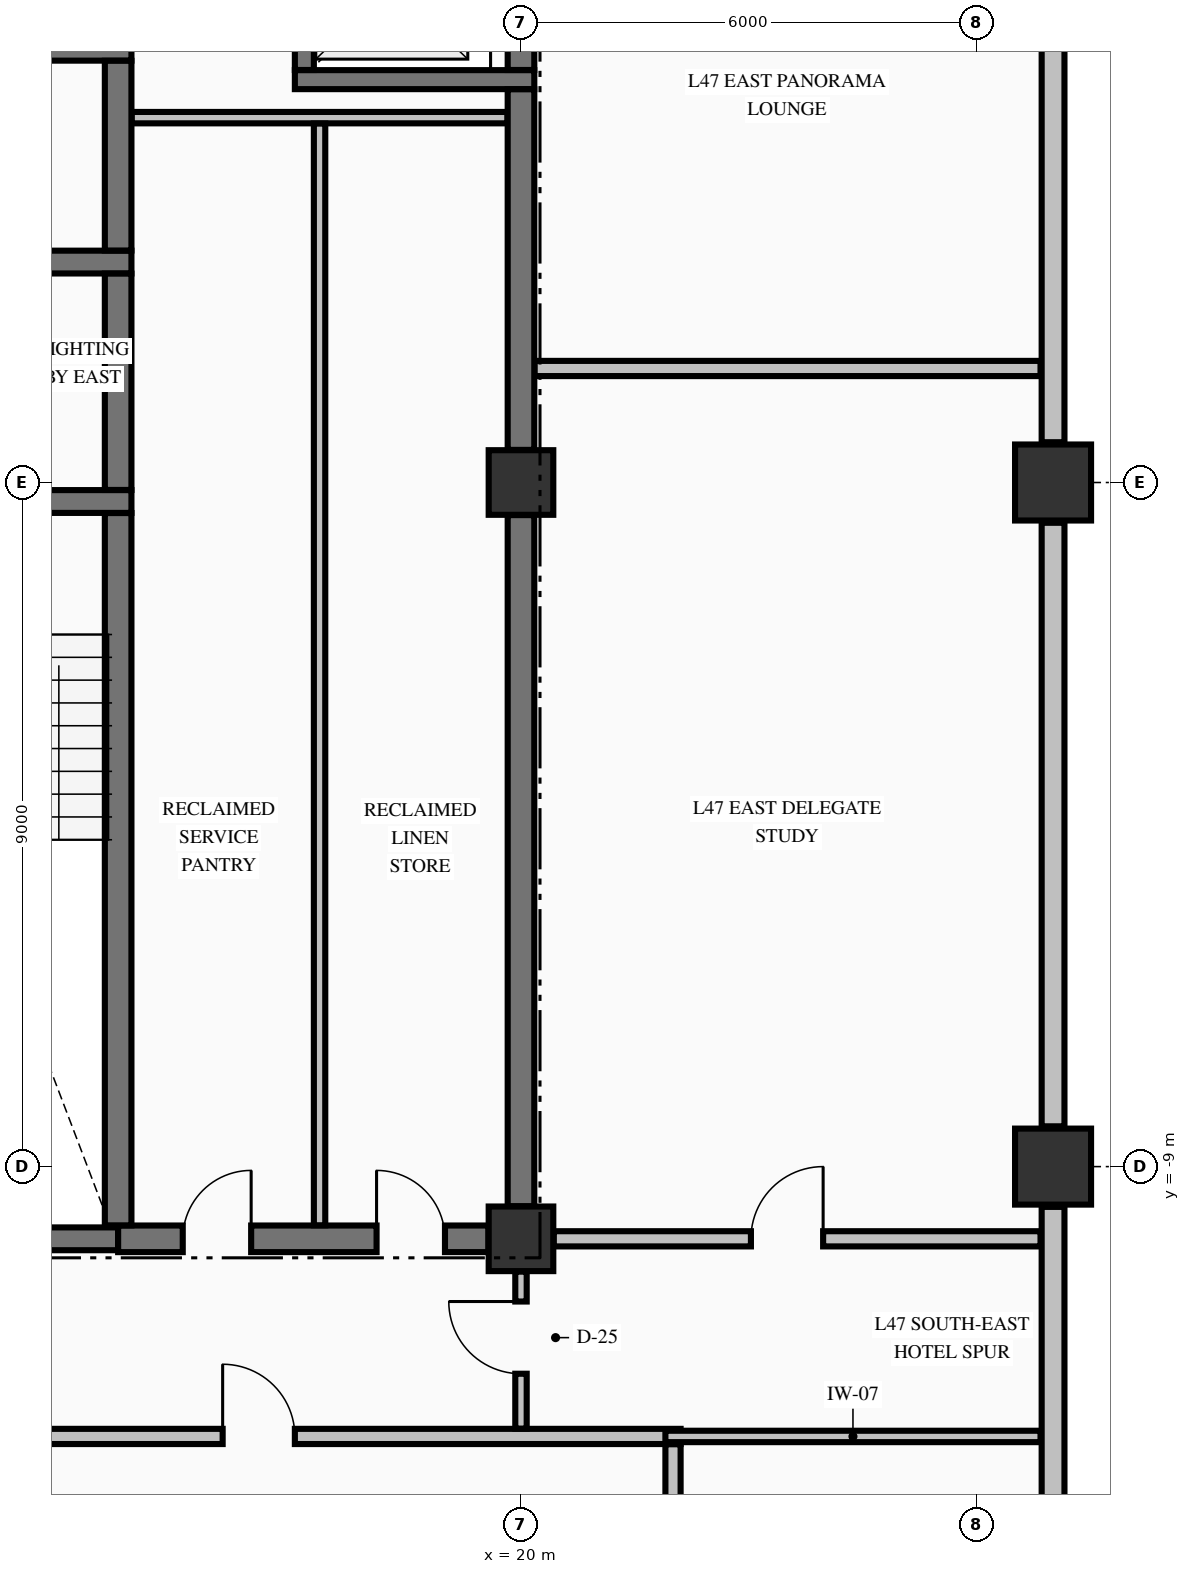
"""IFC4 building model, lengths in metres.
Left out: names, types, materials, properties, quantities, classifications, styles, units other than length and angle.
Written with IfcOpenShell. Run it as: python <this file> out.ifc"""

import sys

from ifc_helpers import new_model, si_unit, direction, frame, frame_2d, origin, origin_2d, place, context, subcontext, project, spatial, rectangle, extrude, element, fill, save


model = new_model("IFC4")
c1 = context("Model", 3, precision=1e-05, world=origin(), true_north=direction((0.0, 1.0)))
c2 = subcontext(c1, "Body", "Model", "MODEL_VIEW")
j1 = project(units=[si_unit("LENGTHUNIT", "METRE"), si_unit("PLANEANGLEUNIT", "RADIAN")], contexts=[c1])
p1 = place(None, origin())
s1 = spatial("IfcSite", under=j1, at=p1, CompositionType="ELEMENT")
p2 = place(p1, origin())
s2 = spatial("IfcBuilding", under=s1, at=p2, CompositionType="ELEMENT")
p3 = place(p2, frame((0.0, 0.0, 183.06)))
s3 = spatial("IfcBuildingStorey", under=s2, at=p3, CompositionType="ELEMENT", Elevation=183.06)
for number, where, z_axis, x_axis in (
    (1, (27.0, -9.0, -0.25), (0.0, 0.0, 1.0), (1.0, 0.0, 0.0)),
    (2, (27.0, 0.0, -0.25), (0.0, 0.0, 1.0), (1.0, 0.0, 0.0)),
):
    element("IfcColumn", number, at=place(p3, frame(where, z_axis=z_axis, x_axis=x_axis)), inside=s3, PredefinedType="COLUMN", context=c2, shape_type="SweptSolid", body=[
        extrude(rectangle(XDim=1.0, YDim=1.0, at=origin_2d()), origin(), (0.0, 0.0, 1.0), 3.225),
    ])
for number, where, z_axis, x_axis in (
    (3, (20.0, -9.95, -0.25), (0.0, 0.0, 1.0), (1.0, 0.0, 0.0)),
    (4, (20.0, 0.0, -0.25), (0.0, 0.0, 1.0), (1.0, 0.0, 0.0)),
):
    element("IfcColumn", number, at=place(p3, frame(where, z_axis=z_axis, x_axis=x_axis)), inside=s3, PredefinedType="COLUMN", context=c2, shape_type="SweptSolid", body=[
        extrude(rectangle(XDim=0.85, YDim=0.85, at=origin_2d()), origin(), (0.0, 0.0, 1.0), 3.225),
    ])
p4 = place(p3, frame((27.0, -18.97, 0.0), z_axis=(0.0, 0.0, 1.0), x_axis=(0.0, 1.0, 0.0)))
e5 = element("IfcWall", 5, at=p4, inside=s3, PredefinedType="STANDARD", context=c2, shape_type="SweptSolid", body=[
    extrude(rectangle(XDim=9.44, YDim=0.3, at=frame_2d((4.72, 0.0))), origin(), (0.0, 0.0, 1.0), 2.367),
])
for number, where, z_axis, x_axis in (
    (6, (27.0, -8.47, 0.0), (0.0, 0.0, 1.0), (0.0, 1.0, 0.0)),
    (7, (27.0, 0.53, 0.0), (0.0, 0.0, 1.0), (0.0, 1.0, 0.0)),
):
    element("IfcWall", number, at=place(p3, frame(where, z_axis=z_axis, x_axis=x_axis)), inside=s3, PredefinedType="STANDARD", context=c2, shape_type="SweptSolid", body=[
        extrude(rectangle(XDim=7.94, YDim=0.3, at=frame_2d((3.97, 0.0))), origin(), (0.0, 0.0, 1.0), 2.367),
    ])
p5 = place(p3, frame((11.429, -9.95, 0.0), z_axis=(0.0, 0.0, 1.0), x_axis=(1.0, 0.0, 0.0)))
e8 = element("IfcWall", 8, at=p5, inside=s3, PredefinedType="SHEAR", context=c2, shape_type="SweptSolid", body=[
    extrude(rectangle(XDim=3.271, YDim=0.3, at=frame_2d((1.635, 0.0))), origin(), (0.0, 0.0, 1.0), 2.975),
])
p6 = place(p3, frame((14.7, -9.95, 0.0), z_axis=(0.0, 0.0, 1.0), x_axis=(1.0, 0.0, 0.0)))
e9 = element("IfcWall", 9, at=p6, inside=s3, PredefinedType="SHEAR", context=c2, shape_type="SweptSolid", body=[
    extrude(rectangle(XDim=4.871, YDim=0.35, at=frame_2d((2.436, 0.0))), origin(), (0.0, 0.0, 1.0), 2.975),
])
p7 = place(p6, frame((0.85, 0.0, 0.0)))
e10 = element("IfcOpeningElement", 10, at=p7, cuts=e9, PredefinedType="OPENING", context=c2, shape_type="SweptSolid", body=[
    extrude(rectangle(XDim=0.9, YDim=2.15, at=frame_2d((0.45, 1.075))), frame((0.0, 0.185, 0.0), z_axis=(0.0, -1.0, 0.0), x_axis=(1.0, 0.0, 0.0)), (0.0, 0.0, 1.0), 0.37),
])
p8 = place(p6, frame((3.4, 0.0, 0.0)))
e11 = element("IfcOpeningElement", 11, at=p8, cuts=e9, PredefinedType="OPENING", context=c2, shape_type="SweptSolid", body=[
    extrude(rectangle(XDim=0.9, YDim=2.15, at=frame_2d((0.45, 1.075))), frame((0.0, 0.185, 0.0), z_axis=(0.0, -1.0, 0.0), x_axis=(1.0, 0.0, 0.0)), (0.0, 0.0, 1.0), 0.37),
])
p9 = place(p3, frame((11.429, -0.25, 0.0), z_axis=(0.0, 0.0, 1.0), x_axis=(1.0, 0.0, 0.0)))
e12 = element("IfcWall", 12, at=p9, inside=s3, PredefinedType="SHEAR", context=c2, shape_type="SweptSolid", body=[
    extrude(rectangle(XDim=3.446, YDim=0.3, at=frame_2d((1.723, 0.0))), origin(), (0.0, 0.0, 1.0), 2.975),
])
p10 = place(p9, frame((1.171, 0.0, 0.0)))
e13 = element("IfcOpeningElement", 13, at=p10, cuts=e12, PredefinedType="OPENING", context=c2, shape_type="SweptSolid", body=[
    extrude(rectangle(XDim=1.1, YDim=2.15, at=frame_2d((0.55, 1.075))), frame((0.0, 0.16, 0.0), z_axis=(0.0, -1.0, 0.0), x_axis=(1.0, 0.0, 0.0)), (0.0, 0.0, 1.0), 0.32),
])
p11 = place(p3, frame((10.85, 2.9, 0.0), z_axis=(0.0, 0.0, 1.0), x_axis=(1.0, 0.0, 0.0)))
e14 = element("IfcWall", 14, at=p11, inside=s3, PredefinedType="SHEAR", context=c2, shape_type="SweptSolid", body=[
    extrude(rectangle(XDim=4.025, YDim=0.3, at=frame_2d((2.012, 0.0))), origin(), (0.0, 0.0, 1.0), 2.975),
])
p12 = place(p11, frame((0.85, 0.0, 0.0)))
e15 = element("IfcOpeningElement", 15, at=p12, cuts=e14, PredefinedType="OPENING", context=c2, shape_type="SweptSolid", body=[
    extrude(rectangle(XDim=1.1, YDim=2.2, at=frame_2d((0.55, 1.1))), frame((0.0, 0.16, 0.0), z_axis=(0.0, -1.0, 0.0), x_axis=(1.0, 0.0, 0.0)), (0.0, 0.0, 1.0), 0.32),
])
p13 = place(p3, frame((17.025, 5.3, 0.0), z_axis=(0.0, 0.0, 1.0), x_axis=(1.0, 0.0, 0.0)))
e16 = element("IfcWall", 16, at=p13, inside=s3, PredefinedType="SOLIDWALL", context=c2, shape_type="SweptSolid", body=[
    extrude(rectangle(XDim=3.15, YDim=0.25, at=frame_2d((1.575, 0.0))), origin(), (0.0, 0.0, 1.0), 2.975),
])
p14 = place(p3, frame((10.85, 5.7, 0.0), z_axis=(0.0, 0.0, 1.0), x_axis=(1.0, 0.0, 0.0)))
e17 = element("IfcWall", 17, at=p14, inside=s3, PredefinedType="SHEAR", context=c2, shape_type="SweptSolid", body=[
    extrude(rectangle(XDim=4.025, YDim=0.3, at=frame_2d((2.012, 0.0))), origin(), (0.0, 0.0, 1.0), 2.975),
])
p15 = place(p3, frame((-17.1, -12.55, 0.0), z_axis=(0.0, 0.0, 1.0), x_axis=(1.0, 0.0, 0.0)))
e18 = element("IfcWall", 18, at=p15, inside=s3, PredefinedType="PARTITIONING", context=c2, shape_type="SweptSolid", body=[
    extrude(rectangle(XDim=39.2, YDim=0.2, at=frame_2d((19.6, 0.0))), origin(), (0.0, 0.0, 1.0), 2.975),
])
p16 = place(p15, frame((6.475, 0.0, 0.0)))
e19 = element("IfcOpeningElement", 19, at=p16, cuts=e18, PredefinedType="OPENING", context=c2, shape_type="SweptSolid", body=[
    extrude(rectangle(XDim=0.95, YDim=2.15, at=frame_2d((0.475, 1.075))), frame((0.0, 0.11, 0.0), z_axis=(0.0, -1.0, 0.0), x_axis=(1.0, 0.0, 0.0)), (0.0, 0.0, 1.0), 0.22),
])
p17 = place(p15, frame((13.525, 0.0, 0.0)))
e20 = element("IfcOpeningElement", 20, at=p17, cuts=e18, PredefinedType="OPENING", context=c2, shape_type="SweptSolid", body=[
    extrude(rectangle(XDim=0.95, YDim=2.15, at=frame_2d((0.475, 1.075))), frame((0.0, 0.11, 0.0), z_axis=(0.0, -1.0, 0.0), x_axis=(1.0, 0.0, 0.0)), (0.0, 0.0, 1.0), 0.22),
])
p18 = place(p15, frame((23.275, 0.0, 0.0)))
e21 = element("IfcOpeningElement", 21, at=p18, cuts=e18, PredefinedType="OPENING", context=c2, shape_type="SweptSolid", body=[
    extrude(rectangle(XDim=0.95, YDim=2.15, at=frame_2d((0.475, 1.075))), frame((0.0, 0.11, 0.0), z_axis=(0.0, -1.0, 0.0), x_axis=(1.0, 0.0, 0.0)), (0.0, 0.0, 1.0), 0.22),
])
p19 = place(p15, frame((33.175, 0.0, 0.0)))
e22 = element("IfcOpeningElement", 22, at=p19, cuts=e18, PredefinedType="OPENING", context=c2, shape_type="SweptSolid", body=[
    extrude(rectangle(XDim=0.95, YDim=2.15, at=frame_2d((0.475, 1.075))), frame((0.0, 0.11, 0.0), z_axis=(0.0, -1.0, 0.0), x_axis=(1.0, 0.0, 0.0)), (0.0, 0.0, 1.0), 0.22),
])
p20 = place(p3, frame((21.9, -12.55, 0.0), z_axis=(0.0, 0.0, 1.0), x_axis=(1.0, 0.0, 0.0)))
e23 = element("IfcWall", 23, at=p20, inside=s3, PredefinedType="PARTITIONING", context=c2, shape_type="SweptSolid", body=[
    extrude(rectangle(XDim=4.935, YDim=0.15, at=frame_2d((2.468, 0.0))), origin(), (0.0, 0.0, 1.0), 2.975),
])
p21 = place(p3, frame((20.431, -9.95, 0.0), z_axis=(0.0, 0.0, 1.0), x_axis=(1.0, 0.0, 0.0)))
e24 = element("IfcWall", 24, at=p21, inside=s3, PredefinedType="PARTITIONING", context=c2, shape_type="SweptSolid", body=[
    extrude(rectangle(XDim=6.404, YDim=0.2, at=frame_2d((3.202, 0.0))), origin(), (0.0, 0.0, 1.0), 2.975),
])
p22 = place(p21, frame((2.594, 0.0, 0.0)))
e25 = element("IfcOpeningElement", 25, at=p22, cuts=e24, PredefinedType="OPENING", context=c2, shape_type="SweptSolid", body=[
    extrude(rectangle(XDim=0.95, YDim=2.15, at=frame_2d((0.475, 1.075))), frame((0.0, 0.11, 0.0), z_axis=(0.0, -1.0, 0.0), x_axis=(1.0, 0.0, 0.0)), (0.0, 0.0, 1.0), 0.22),
])
p23 = place(p3, frame((20.178, 1.5, 0.0), z_axis=(0.0, 0.0, 1.0), x_axis=(1.0, 0.0, 0.0)))
e26 = element("IfcWall", 26, at=p23, inside=s3, PredefinedType="PARTITIONING", context=c2, shape_type="SweptSolid", body=[
    extrude(rectangle(XDim=6.657, YDim=0.2, at=frame_2d((3.329, 0.0))), origin(), (0.0, 0.0, 1.0), 2.975),
])
p24 = place(p3, frame((14.878, 4.8, 0.0), z_axis=(0.0, 0.0, 1.0), x_axis=(1.0, 0.0, 0.0)))
e27 = element("IfcWall", 27, at=p24, inside=s3, PredefinedType="PARTITIONING", context=c2, shape_type="SweptSolid", body=[
    extrude(rectangle(XDim=4.944, YDim=0.15, at=frame_2d((2.472, 0.0))), origin(), (0.0, 0.0, 1.0), 2.975),
])
p25 = place(p3, frame((14.7, -9.773, 0.0), z_axis=(0.0, 0.0, 1.0), x_axis=(0.0, 1.0, 0.0)))
e28 = element("IfcWall", 28, at=p25, inside=s3, PredefinedType="SHEAR", context=c2, shape_type="SweptSolid", body=[
    extrude(rectangle(XDim=9.371, YDim=0.35, at=frame_2d((4.686, 0.0))), origin(), (0.0, 0.0, 1.0), 2.975),
])
p26 = place(p3, frame((14.7, -0.098, 0.0), z_axis=(0.0, 0.0, 1.0), x_axis=(0.0, 1.0, 0.0)))
e29 = element("IfcWall", 29, at=p26, inside=s3, PredefinedType="SHEAR", context=c2, shape_type="SweptSolid", body=[
    extrude(rectangle(XDim=2.846, YDim=0.35, at=frame_2d((1.423, 0.0))), origin(), (0.0, 0.0, 1.0), 2.975),
])
p27 = place(p3, frame((14.7, 3.052, 0.0), z_axis=(0.0, 0.0, 1.0), x_axis=(0.0, 1.0, 0.0)))
e30 = element("IfcWall", 30, at=p27, inside=s3, PredefinedType="SHEAR", context=c2, shape_type="SweptSolid", body=[
    extrude(rectangle(XDim=2.496, YDim=0.35, at=frame_2d((1.248, 0.0))), origin(), (0.0, 0.0, 1.0), 2.975),
])
p28 = place(p3, frame((17.15, 5.427, 0.0), z_axis=(0.0, 0.0, 1.0), x_axis=(0.0, 1.0, 0.0)))
e31 = element("IfcWall", 31, at=p28, inside=s3, PredefinedType="SOLIDWALL", context=c2, shape_type="SweptSolid", body=[
    extrude(rectangle(XDim=2.196, YDim=0.25, at=frame_2d((1.098, 0.0))), origin(), (0.0, 0.0, 1.0), 2.975),
])
p29 = place(p28, frame((0.548, 0.0, 0.0)))
e32 = element("IfcOpeningElement", 32, at=p29, cuts=e31, PredefinedType="OPENING", context=c2, shape_type="SweptSolid", body=[
    extrude(rectangle(XDim=1.1, YDim=2.2, at=frame_2d((0.55, 1.1))), frame((0.0, 0.135, 0.0), z_axis=(0.0, -1.0, 0.0), x_axis=(1.0, 0.0, 0.0)), (0.0, 0.0, 1.0), 0.27),
])
p30 = place(p3, frame((20.0, -9.521, 0.0), z_axis=(0.0, 0.0, 1.0), x_axis=(0.0, 1.0, 0.0)))
e33 = element("IfcWall", 33, at=p30, inside=s3, PredefinedType="SHEAR", context=c2, shape_type="SweptSolid", body=[
    extrude(rectangle(XDim=9.092, YDim=0.35, at=frame_2d((4.546, 0.0))), origin(), (0.0, 0.0, 1.0), 2.975),
])
p31 = place(p3, frame((20.0, 0.429, 0.0), z_axis=(0.0, 0.0, 1.0), x_axis=(0.0, 1.0, 0.0)))
e34 = element("IfcWall", 34, at=p31, inside=s3, PredefinedType="SHEAR", context=c2, shape_type="SweptSolid", body=[
    extrude(rectangle(XDim=4.744, YDim=0.35, at=frame_2d((2.372, 0.0))), origin(), (0.0, 0.0, 1.0), 2.975),
])
p32 = place(p3, frame((20.0, 5.427, 0.0), z_axis=(0.0, 0.0, 1.0), x_axis=(0.0, 1.0, 0.0)))
e35 = element("IfcWall", 35, at=p32, inside=s3, PredefinedType="SHEAR", context=c2, shape_type="SweptSolid", body=[
    extrude(rectangle(XDim=2.196, YDim=0.35, at=frame_2d((1.098, 0.0))), origin(), (0.0, 0.0, 1.0), 2.975),
])
p33 = place(p3, frame((17.35, -9.772, 0.0), z_axis=(0.0, 0.0, 1.0), x_axis=(0.0, 1.0, 0.0)))
e36 = element("IfcWall", 36, at=p33, inside=s3, PredefinedType="PARTITIONING", context=c2, shape_type="SweptSolid", body=[
    extrude(rectangle(XDim=14.494, YDim=0.15, at=frame_2d((7.247, 0.0))), origin(), (0.0, 0.0, 1.0), 2.975),
])
p34 = place(p3, frame((20.0, -12.447, 0.0), z_axis=(0.0, 0.0, 1.0), x_axis=(0.0, 1.0, 0.0)))
e37 = element("IfcWall", 37, at=p34, inside=s3, PredefinedType="PARTITIONING", context=c2, shape_type="SweptSolid", body=[
    extrude(rectangle(XDim=2.066, YDim=0.15, at=frame_2d((1.033, 0.0))), origin(), (0.0, 0.0, 1.0), 2.167),
])
p35 = place(p34, frame((0.722, 0.0, 0.0)))
e38 = element("IfcOpeningElement", 38, at=p35, cuts=e37, PredefinedType="OPENING", context=c2, shape_type="SweptSolid", body=[
    extrude(rectangle(XDim=0.95, YDim=2.02, at=frame_2d((0.475, 1.01))), frame((0.0, 0.085, 0.0), z_axis=(0.0, -1.0, 0.0), x_axis=(1.0, 0.0, 0.0)), (0.0, 0.0, 1.0), 0.17),
])
p36 = place(p3, frame((22.0, -18.994, 0.0), z_axis=(0.0, 0.0, 1.0), x_axis=(0.0, 1.0, 0.0)))
e39 = element("IfcWall", 39, at=p36, inside=s3, PredefinedType="PARTITIONING", context=c2, shape_type="SweptSolid", body=[
    extrude(rectangle(XDim=6.341, YDim=0.2, at=frame_2d((3.17, 0.0))), origin(), (0.0, 0.0, 1.0), 2.975),
])
p37 = place(p7, origin())
e40 = element("IfcDoor", 40, at=p37, inside=s3, OperationType="SINGLE_SWING_RIGHT", PredefinedType="DOOR", context=c2, shape_type="SweptSolid", body=[
    extrude(rectangle(XDim=0.9, YDim=2.15, at=frame_2d((0.45, 1.075))), frame((0.0, 0.025, 0.0), z_axis=(0.0, -1.0, 0.0), x_axis=(1.0, 0.0, 0.0)), (0.0, 0.0, 1.0), 0.05),
])
fill(e10, e40)
p38 = place(p8, origin())
e41 = element("IfcDoor", 41, at=p38, inside=s3, OperationType="SINGLE_SWING_LEFT", PredefinedType="DOOR", context=c2, shape_type="SweptSolid", body=[
    extrude(rectangle(XDim=0.9, YDim=2.15, at=frame_2d((0.45, 1.075))), frame((0.0, 0.025, 0.0), z_axis=(0.0, -1.0, 0.0), x_axis=(1.0, 0.0, 0.0)), (0.0, 0.0, 1.0), 0.05),
])
fill(e11, e41)
p39 = place(p19, origin())
e42 = element("IfcDoor", 42, at=p39, inside=s3, OperationType="SINGLE_SWING_LEFT", PredefinedType="DOOR", context=c2, shape_type="SweptSolid", body=[
    extrude(rectangle(XDim=0.95, YDim=2.15, at=frame_2d((0.475, 1.075))), frame((0.0, 0.025, 0.0), z_axis=(0.0, -1.0, 0.0), x_axis=(1.0, 0.0, 0.0)), (0.0, 0.0, 1.0), 0.05),
])
fill(e22, e42)
p40 = place(p35, origin())
e43 = element("IfcDoor", 43, at=p40, inside=s3, OperationType="SINGLE_SWING_RIGHT", PredefinedType="DOOR", context=c2, shape_type="SweptSolid", body=[
    extrude(rectangle(XDim=0.95, YDim=2.02, at=frame_2d((0.475, 1.01))), frame((0.0, 0.025, 0.0), z_axis=(0.0, -1.0, 0.0), x_axis=(1.0, 0.0, 0.0)), (0.0, 0.0, 1.0), 0.05),
])
fill(e38, e43)
p41 = place(p22, origin())
e44 = element("IfcDoor", 44, at=p41, inside=s3, OperationType="SINGLE_SWING_RIGHT", PredefinedType="DOOR", context=c2, shape_type="SweptSolid", body=[
    extrude(rectangle(XDim=0.95, YDim=2.15, at=frame_2d((0.475, 1.075))), frame((0.0, 0.025, 0.0), z_axis=(0.0, -1.0, 0.0), x_axis=(1.0, 0.0, 0.0)), (0.0, 0.0, 1.0), 0.05),
])
fill(e25, e44)
save(model, sys.argv[1])
